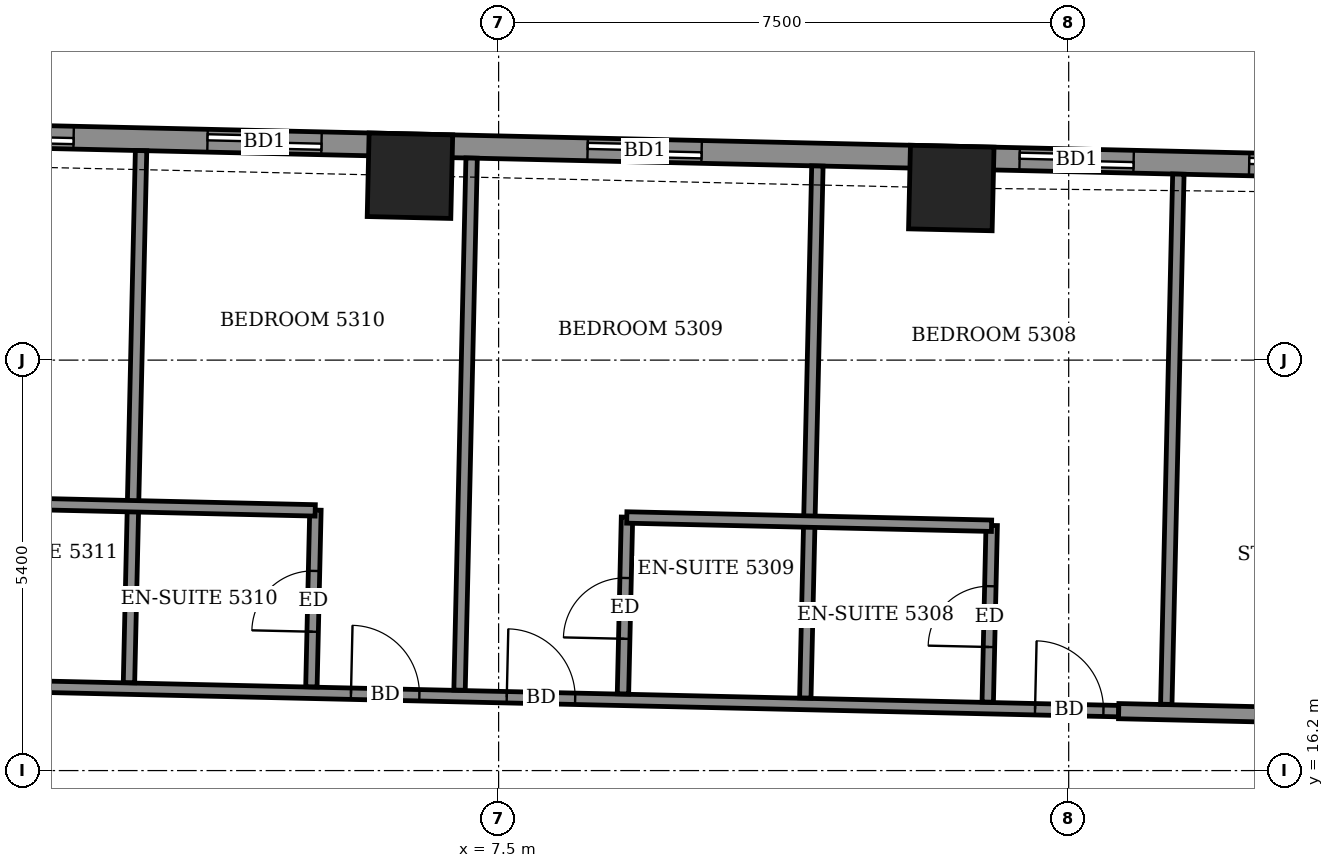
"""IFC4 building model, lengths in metres.
Left out: names, types, materials, properties, quantities, classifications, styles, units other than length and angle.
Written with IfcOpenShell. Run it as: python <this file> out.ifc"""

import sys

from ifc_helpers import new_model, si_unit, direction, frame, frame_2d, origin, origin_2d, place, context, subcontext, project, spatial, rectangle, extrude, element, fill, save


model = new_model("IFC4")
c1 = context("Model", 3, precision=1e-05, world=origin(), true_north=direction((0.0, 1.0)))
c2 = subcontext(c1, "Body", "Model", "MODEL_VIEW")
j1 = project(units=[si_unit("LENGTHUNIT", "METRE"), si_unit("PLANEANGLEUNIT", "RADIAN")], contexts=[c1])
p1 = place(None, origin())
s1 = spatial("IfcSite", under=j1, at=p1, CompositionType="ELEMENT")
p2 = place(p1, origin())
s2 = spatial("IfcBuilding", under=s1, at=p2, CompositionType="ELEMENT")
p3 = place(p2, frame((0.0, 0.0, 208.7)))
s3 = spatial("IfcBuildingStorey", under=s2, at=p3, CompositionType="ELEMENT", Elevation=208.7)
for number, where, z_axis, x_axis in (
    (1, (13.456, 23.864, -0.55), (0.0, 0.0, 1.0), (-1.0, 0.023, 0.0)),
    (2, (6.333, 24.026, -0.55), (0.0, 0.0, 1.0), (-1.0, 0.023, 0.0)),
):
    element("IfcColumn", number, at=place(p3, frame(where, z_axis=z_axis, x_axis=x_axis)), inside=s3, PredefinedType="COLUMN", context=c2, shape_type="SweptSolid", body=[
        extrude(rectangle(XDim=1.1, YDim=1.1, at=origin_2d()), origin(), (0.0, 0.0, 1.0), 3.6),
    ])
p4 = place(p3, frame((20.437, 24.106, 0.0), z_axis=(0.0, 0.0, 1.0), x_axis=(-0.999742506232, 0.022691875925, 0.0)))
e3 = element("IfcWall", 3, at=p4, inside=s3, PredefinedType="SOLIDWALL", context=c2, shape_type="SweptSolid", body=[
    extrude(rectangle(XDim=42.444, YDim=0.3, at=frame_2d((21.222, 0.0))), origin(), (0.0, 0.0, 1.0), 2.55),
])
p5 = place(p4, frame((1.563, 0.0, 0.0)))
e4 = element("IfcOpeningElement", 4, at=p5, cuts=e3, PredefinedType="OPENING", context=c2, shape_type="SweptSolid", body=[
    extrude(rectangle(XDim=1.5, YDim=2.4, at=frame_2d((0.75, 1.2))), frame((0.0, 0.16, 0.0), z_axis=(0.0, -1.0, 0.0), x_axis=(1.0, 0.0, 0.0)), (0.0, 0.0, 1.0), 0.32),
])
p6 = place(p4, frame((4.584, 0.0, 0.0)))
e5 = element("IfcOpeningElement", 5, at=p6, cuts=e3, PredefinedType="OPENING", context=c2, shape_type="SweptSolid", body=[
    extrude(rectangle(XDim=1.5, YDim=2.4, at=frame_2d((0.75, 1.2))), frame((0.0, 0.16, 0.0), z_axis=(0.0, -1.0, 0.0), x_axis=(1.0, 0.0, 0.0)), (0.0, 0.0, 1.0), 0.32),
])
p7 = place(p4, frame((10.269, 0.0, 0.0)))
e6 = element("IfcOpeningElement", 6, at=p7, cuts=e3, PredefinedType="OPENING", context=c2, shape_type="SweptSolid", body=[
    extrude(rectangle(XDim=1.5, YDim=2.4, at=frame_2d((0.75, 1.2))), frame((0.0, 0.16, 0.0), z_axis=(0.0, -1.0, 0.0), x_axis=(1.0, 0.0, 0.0)), (0.0, 0.0, 1.0), 0.32),
])
p8 = place(p4, frame((15.271, 0.0, 0.0)))
e7 = element("IfcOpeningElement", 7, at=p8, cuts=e3, PredefinedType="OPENING", context=c2, shape_type="SweptSolid", body=[
    extrude(rectangle(XDim=1.5, YDim=2.4, at=frame_2d((0.75, 1.2))), frame((0.0, 0.16, 0.0), z_axis=(0.0, -1.0, 0.0), x_axis=(1.0, 0.0, 0.0)), (0.0, 0.0, 1.0), 0.32),
])
p9 = place(p4, frame((18.533, 0.0, 0.0)))
e8 = element("IfcOpeningElement", 8, at=p9, cuts=e3, PredefinedType="OPENING", context=c2, shape_type="SweptSolid", body=[
    extrude(rectangle(XDim=1.5, YDim=2.4, at=frame_2d((0.75, 1.2))), frame((0.0, 0.16, 0.0), z_axis=(0.0, -1.0, 0.0), x_axis=(1.0, 0.0, 0.0)), (0.0, 0.0, 1.0), 0.32),
])
p10 = place(p4, frame((23.819, 0.0, 0.0)))
e9 = element("IfcOpeningElement", 9, at=p10, cuts=e3, PredefinedType="OPENING", context=c2, shape_type="SweptSolid", body=[
    extrude(rectangle(XDim=1.5, YDim=2.4, at=frame_2d((0.75, 1.2))), frame((0.0, 0.16, 0.0), z_axis=(0.0, -1.0, 0.0), x_axis=(1.0, 0.0, 0.0)), (0.0, 0.0, 1.0), 0.32),
])
p11 = place(p4, frame((29.345, 0.0, 0.0)))
e10 = element("IfcOpeningElement", 10, at=p11, cuts=e3, PredefinedType="OPENING", context=c2, shape_type="SweptSolid", body=[
    extrude(rectangle(XDim=1.5, YDim=2.4, at=frame_2d((0.75, 1.2))), frame((0.0, 0.16, 0.0), z_axis=(0.0, -1.0, 0.0), x_axis=(1.0, 0.0, 0.0)), (0.0, 0.0, 1.0), 0.32),
])
p12 = place(p4, frame((32.607, 0.0, 0.0)))
e11 = element("IfcOpeningElement", 11, at=p12, cuts=e3, PredefinedType="OPENING", context=c2, shape_type="SweptSolid", body=[
    extrude(rectangle(XDim=1.5, YDim=2.4, at=frame_2d((0.75, 1.2))), frame((0.0, 0.16, 0.0), z_axis=(0.0, -1.0, 0.0), x_axis=(1.0, 0.0, 0.0)), (0.0, 0.0, 1.0), 0.32),
])
p13 = place(p4, frame((37.783, 0.0, 0.9)))
e12 = element("IfcOpeningElement", 12, at=p13, cuts=e3, PredefinedType="OPENING", context=c2, shape_type="SweptSolid", body=[
    extrude(rectangle(XDim=2.4, YDim=1.5, at=frame_2d((1.2, 0.75))), frame((0.0, 0.16, 0.0), z_axis=(0.0, -1.0, 0.0), x_axis=(1.0, 0.0, 0.0)), (0.0, 0.0, 1.0), 0.32),
])
p14 = place(p3, frame((-14.871, 17.675, 0.0), z_axis=(0.0, 0.0, 1.0), x_axis=(0.999742359486, -0.02269834024, 0.0)))
e13 = element("IfcWall", 13, at=p14, inside=s3, PredefinedType="PARTITIONING", context=c2, shape_type="SweptSolid", body=[
    extrude(rectangle(XDim=30.536, YDim=0.15, at=frame_2d((15.268, 0.0))), origin(), (0.0, 0.0, 1.0), 3.05),
])
p15 = place(p14, frame((29.436, 0.0, 0.0)))
e14 = element("IfcOpeningElement", 14, at=p15, cuts=e13, PredefinedType="OPENING", context=c2, shape_type="SweptSolid", body=[
    extrude(rectangle(XDim=0.9, YDim=2.1, at=frame_2d((0.45, 1.05))), frame((0.0, 0.085, 0.0), z_axis=(0.0, -1.0, 0.0), x_axis=(1.0, 0.0, 0.0)), (0.0, 0.0, 1.0), 0.17),
])
p16 = place(p14, frame((22.484, 0.0, 0.0)))
e15 = element("IfcOpeningElement", 15, at=p16, cuts=e13, PredefinedType="OPENING", context=c2, shape_type="SweptSolid", body=[
    extrude(rectangle(XDim=0.9, YDim=2.1, at=frame_2d((0.45, 1.05))), frame((0.0, 0.085, 0.0), z_axis=(0.0, -1.0, 0.0), x_axis=(1.0, 0.0, 0.0)), (0.0, 0.0, 1.0), 0.17),
])
p17 = place(p14, frame((20.434, 0.0, 0.0)))
e16 = element("IfcOpeningElement", 16, at=p17, cuts=e13, PredefinedType="OPENING", context=c2, shape_type="SweptSolid", body=[
    extrude(rectangle(XDim=0.9, YDim=2.1, at=frame_2d((0.45, 1.05))), frame((0.0, 0.085, 0.0), z_axis=(0.0, -1.0, 0.0), x_axis=(1.0, 0.0, 0.0)), (0.0, 0.0, 1.0), 0.17),
])
p18 = place(p14, frame((13.484, 0.0, 0.0)))
e17 = element("IfcOpeningElement", 17, at=p18, cuts=e13, PredefinedType="OPENING", context=c2, shape_type="SweptSolid", body=[
    extrude(rectangle(XDim=0.9, YDim=2.1, at=frame_2d((0.45, 1.05))), frame((0.0, 0.085, 0.0), z_axis=(0.0, -1.0, 0.0), x_axis=(1.0, 0.0, 0.0)), (0.0, 0.0, 1.0), 0.17),
])
p19 = place(p14, frame((11.334, 0.0, 0.0)))
e18 = element("IfcOpeningElement", 18, at=p19, cuts=e13, PredefinedType="OPENING", context=c2, shape_type="SweptSolid", body=[
    extrude(rectangle(XDim=0.9, YDim=2.1, at=frame_2d((0.45, 1.05))), frame((0.0, 0.085, 0.0), z_axis=(0.0, -1.0, 0.0), x_axis=(1.0, 0.0, 0.0)), (0.0, 0.0, 1.0), 0.17),
])
p20 = place(p14, frame((4.359, 0.0, 0.0)))
e19 = element("IfcOpeningElement", 19, at=p20, cuts=e13, PredefinedType="OPENING", context=c2, shape_type="SweptSolid", body=[
    extrude(rectangle(XDim=0.9, YDim=2.1, at=frame_2d((0.45, 1.05))), frame((0.0, 0.085, 0.0), z_axis=(0.0, -1.0, 0.0), x_axis=(1.0, 0.0, 0.0)), (0.0, 0.0, 1.0), 0.17),
])
p21 = place(p14, frame((2.009, 0.0, 0.0)))
e20 = element("IfcOpeningElement", 20, at=p21, cuts=e13, PredefinedType="OPENING", context=c2, shape_type="SweptSolid", body=[
    extrude(rectangle(XDim=0.9, YDim=2.1, at=frame_2d((0.45, 1.05))), frame((0.0, 0.085, 0.0), z_axis=(0.0, -1.0, 0.0), x_axis=(1.0, 0.0, 0.0)), (0.0, 0.0, 1.0), 0.17),
])
p22 = place(p3, frame((15.658, 16.982, 0.0), z_axis=(0.0, 0.0, 1.0), x_axis=(0.99974485859, -0.022587999516, 0.0)))
e21 = element("IfcWall", 21, at=p22, inside=s3, PredefinedType="PARTITIONING", context=c2, shape_type="SweptSolid", body=[
    extrude(rectangle(XDim=7.566, YDim=0.2, at=frame_2d((3.783, 0.0))), origin(), (0.0, 0.0, 1.0), 3.05),
])
p23 = place(p22, frame((3.658, 0.0, 0.0)))
e22 = element("IfcOpeningElement", 22, at=p23, cuts=e21, PredefinedType="OPENING", context=c2, shape_type="SweptSolid", body=[
    extrude(rectangle(XDim=1.0, YDim=2.1, at=frame_2d((0.5, 1.05))), frame((0.0, 0.11, 0.0), z_axis=(0.0, -1.0, 0.0), x_axis=(1.0, 0.0, 0.0)), (0.0, 0.0, 1.0), 0.22),
])
p24 = place(p3, frame((2.637, 17.357, 0.0), z_axis=(0.0, 0.0, 1.0), x_axis=(0.022702393474, 0.999742267452, 0.0)))
e23 = element("IfcWall", 23, at=p24, inside=s3, PredefinedType="PARTITIONING", context=c2, shape_type="SweptSolid", body=[
    extrude(rectangle(XDim=7.001, YDim=0.15, at=frame_2d((3.5, 0.0))), origin(), (0.0, 0.0, 1.0), 2.5),
])
p25 = place(p3, frame((5.037, 17.302, 0.0), z_axis=(0.0, 0.0, 1.0), x_axis=(0.022781023197, 0.999740478815, 0.0)))
e24 = element("IfcWall", 24, at=p25, inside=s3, PredefinedType="PARTITIONING", context=c2, shape_type="SweptSolid", body=[
    extrude(rectangle(XDim=2.325, YDim=0.15, at=frame_2d((1.163, 0.0))), origin(), (0.0, 0.0, 1.0), 3.05),
])
p26 = place(p25, frame((0.725, 0.0, 0.0)))
e25 = element("IfcOpeningElement", 25, at=p26, cuts=e24, PredefinedType="OPENING", context=c2, shape_type="SweptSolid", body=[
    extrude(rectangle(XDim=0.8, YDim=2.1, at=frame_2d((0.4, 1.05))), frame((0.0, 0.085, 0.0), z_axis=(0.0, -1.0, 0.0), x_axis=(1.0, 0.0, 0.0)), (0.0, 0.0, 1.0), 0.17),
])
p27 = place(p3, frame((6.986, 17.258, 0.0), z_axis=(0.0, 0.0, 1.0), x_axis=(0.022699227919, 0.999742339331, 0.0)))
e26 = element("IfcWall", 26, at=p27, inside=s3, PredefinedType="PARTITIONING", context=c2, shape_type="SweptSolid", body=[
    extrude(rectangle(XDim=7.002, YDim=0.15, at=frame_2d((3.501, 0.0))), origin(), (0.0, 0.0, 1.0), 2.5),
])
p28 = place(p3, frame((9.136, 17.209, 0.0), z_axis=(0.0, 0.0, 1.0), x_axis=(0.022781023197, 0.999740478815, 0.0)))
e27 = element("IfcWall", 27, at=p28, inside=s3, PredefinedType="PARTITIONING", context=c2, shape_type="SweptSolid", body=[
    extrude(rectangle(XDim=2.325, YDim=0.15, at=frame_2d((1.163, 0.0))), origin(), (0.0, 0.0, 1.0), 3.05),
])
p29 = place(p28, frame((0.725, 0.0, 0.0)))
e28 = element("IfcOpeningElement", 28, at=p29, cuts=e27, PredefinedType="OPENING", context=c2, shape_type="SweptSolid", body=[
    extrude(rectangle(XDim=0.8, YDim=2.1, at=frame_2d((0.4, 1.05))), frame((0.0, 0.085, 0.0), z_axis=(0.0, -1.0, 0.0), x_axis=(1.0, 0.0, 0.0)), (0.0, 0.0, 1.0), 0.17),
])
p30 = place(p3, frame((11.535, 17.155, 0.0), z_axis=(0.0, 0.0, 1.0), x_axis=(0.022737248567, 0.999741475346, 0.0)))
e29 = element("IfcWall", 29, at=p30, inside=s3, PredefinedType="PARTITIONING", context=c2, shape_type="SweptSolid", body=[
    extrude(rectangle(XDim=7.001, YDim=0.15, at=frame_2d((3.5, 0.0))), origin(), (0.0, 0.0, 1.0), 2.5),
])
p31 = place(p3, frame((13.935, 17.101, 0.0), z_axis=(0.0, 0.0, 1.0), x_axis=(0.022370700241, 0.999749744571, 0.0)))
e30 = element("IfcWall", 30, at=p31, inside=s3, PredefinedType="PARTITIONING", context=c2, shape_type="SweptSolid", body=[
    extrude(rectangle(XDim=2.324, YDim=0.15, at=frame_2d((1.162, 0.0))), origin(), (0.0, 0.0, 1.0), 3.05),
])
p32 = place(p31, frame((0.725, 0.0, 0.0)))
e31 = element("IfcOpeningElement", 31, at=p32, cuts=e30, PredefinedType="OPENING", context=c2, shape_type="SweptSolid", body=[
    extrude(rectangle(XDim=0.8, YDim=2.1, at=frame_2d((0.4, 1.05))), frame((0.0, 0.085, 0.0), z_axis=(0.0, -1.0, 0.0), x_axis=(1.0, 0.0, 0.0)), (0.0, 0.0, 1.0), 0.17),
])
p33 = place(p3, frame((16.284, 17.072, 0.0), z_axis=(0.0, 0.0, 1.0), x_axis=(0.022815200701, 0.99973969943, 0.0)))
e32 = element("IfcWall", 32, at=p33, inside=s3, PredefinedType="PARTITIONING", context=c2, shape_type="SweptSolid", body=[
    extrude(rectangle(XDim=6.977, YDim=0.15, at=frame_2d((3.488, 0.0))), origin(), (0.0, 0.0, 1.0), 2.55),
])
p34 = place(p3, frame((0.289, 19.732, 0.0), z_axis=(0.0, 0.0, 1.0), x_axis=(0.999742570398, -0.022689048768, 0.0)))
e33 = element("IfcWall", 33, at=p34, inside=s3, PredefinedType="PARTITIONING", context=c2, shape_type="SweptSolid", body=[
    extrude(rectangle(XDim=4.799, YDim=0.15, at=frame_2d((2.399, 0.0))), origin(), (0.0, 0.0, 1.0), 3.05),
])
p35 = place(p3, frame((9.186, 19.53, 0.0), z_axis=(0.0, 0.0, 1.0), x_axis=(0.99974154664, -0.022734113616, 0.0)))
e34 = element("IfcWall", 34, at=p35, inside=s3, PredefinedType="PARTITIONING", context=c2, shape_type="SweptSolid", body=[
    extrude(rectangle(XDim=4.8, YDim=0.15, at=frame_2d((2.4, 0.0))), origin(), (0.0, 0.0, 1.0), 3.05),
])
p36 = place(p5, origin())
e35 = element("IfcDoor", 35, at=p36, inside=s3, OperationType="SLIDING_TO_LEFT", PredefinedType="DOOR", context=c2, shape_type="SweptSolid", body=[
    extrude(rectangle(XDim=1.5, YDim=2.4, at=frame_2d((0.75, 1.2))), frame((0.0, 0.025, 0.0), z_axis=(0.0, -1.0, 0.0), x_axis=(1.0, 0.0, 0.0)), (0.0, 0.0, 1.0), 0.05),
])
fill(e4, e35)
p37 = place(p6, origin())
e36 = element("IfcDoor", 36, at=p37, inside=s3, OperationType="SLIDING_TO_LEFT", PredefinedType="DOOR", context=c2, shape_type="SweptSolid", body=[
    extrude(rectangle(XDim=1.5, YDim=2.4, at=frame_2d((0.75, 1.2))), frame((0.0, 0.025, 0.0), z_axis=(0.0, -1.0, 0.0), x_axis=(1.0, 0.0, 0.0)), (0.0, 0.0, 1.0), 0.05),
])
fill(e5, e36)
p38 = place(p7, origin())
e37 = element("IfcDoor", 37, at=p38, inside=s3, OperationType="SLIDING_TO_LEFT", PredefinedType="DOOR", context=c2, shape_type="SweptSolid", body=[
    extrude(rectangle(XDim=1.5, YDim=2.4, at=frame_2d((0.75, 1.2))), frame((0.0, 0.025, 0.0), z_axis=(0.0, -1.0, 0.0), x_axis=(1.0, 0.0, 0.0)), (0.0, 0.0, 1.0), 0.05),
])
fill(e6, e37)
p39 = place(p8, origin())
e38 = element("IfcDoor", 38, at=p39, inside=s3, OperationType="SLIDING_TO_LEFT", PredefinedType="DOOR", context=c2, shape_type="SweptSolid", body=[
    extrude(rectangle(XDim=1.5, YDim=2.4, at=frame_2d((0.75, 1.2))), frame((0.0, 0.025, 0.0), z_axis=(0.0, -1.0, 0.0), x_axis=(1.0, 0.0, 0.0)), (0.0, 0.0, 1.0), 0.05),
])
fill(e7, e38)
p40 = place(p9, origin())
e39 = element("IfcDoor", 39, at=p40, inside=s3, OperationType="SLIDING_TO_LEFT", PredefinedType="DOOR", context=c2, shape_type="SweptSolid", body=[
    extrude(rectangle(XDim=1.5, YDim=2.4, at=frame_2d((0.75, 1.2))), frame((0.0, 0.025, 0.0), z_axis=(0.0, -1.0, 0.0), x_axis=(1.0, 0.0, 0.0)), (0.0, 0.0, 1.0), 0.05),
])
fill(e8, e39)
p41 = place(p15, origin())
e40 = element("IfcDoor", 40, at=p41, inside=s3, OperationType="SINGLE_SWING_RIGHT", PredefinedType="DOOR", context=c2, shape_type="SweptSolid", body=[
    extrude(rectangle(XDim=0.9, YDim=2.1, at=frame_2d((0.45, 1.05))), frame((0.0, 0.025, 0.0), z_axis=(0.0, -1.0, 0.0), x_axis=(1.0, 0.0, 0.0)), (0.0, 0.0, 1.0), 0.05),
])
fill(e14, e40)
p42 = place(p32, origin())
e41 = element("IfcDoor", 41, at=p42, inside=s3, OperationType="SINGLE_SWING_RIGHT", PredefinedType="DOOR", context=c2, shape_type="SweptSolid", body=[
    extrude(rectangle(XDim=0.8, YDim=2.1, at=frame_2d((0.4, 1.05))), frame((0.0, 0.025, 0.0), z_axis=(0.0, -1.0, 0.0), x_axis=(1.0, 0.0, 0.0)), (0.0, 0.0, 1.0), 0.05),
])
fill(e31, e41)
p43 = place(p16, origin())
e42 = element("IfcDoor", 42, at=p43, inside=s3, OperationType="SINGLE_SWING_LEFT", PredefinedType="DOOR", context=c2, shape_type="SweptSolid", body=[
    extrude(rectangle(XDim=0.9, YDim=2.1, at=frame_2d((0.45, 1.05))), frame((0.0, 0.025, 0.0), z_axis=(0.0, -1.0, 0.0), x_axis=(1.0, 0.0, 0.0)), (0.0, 0.0, 1.0), 0.05),
])
fill(e15, e42)
p44 = place(p29, origin())
e43 = element("IfcDoor", 43, at=p44, inside=s3, OperationType="SINGLE_SWING_LEFT", PredefinedType="DOOR", context=c2, shape_type="SweptSolid", body=[
    extrude(rectangle(XDim=0.8, YDim=2.1, at=frame_2d((0.4, 1.05))), frame((0.0, 0.025, 0.0), z_axis=(0.0, -1.0, 0.0), x_axis=(1.0, 0.0, 0.0)), (0.0, 0.0, 1.0), 0.05),
])
fill(e28, e43)
p45 = place(p17, origin())
e44 = element("IfcDoor", 44, at=p45, inside=s3, OperationType="SINGLE_SWING_RIGHT", PredefinedType="DOOR", context=c2, shape_type="SweptSolid", body=[
    extrude(rectangle(XDim=0.9, YDim=2.1, at=frame_2d((0.45, 1.05))), frame((0.0, 0.025, 0.0), z_axis=(0.0, -1.0, 0.0), x_axis=(1.0, 0.0, 0.0)), (0.0, 0.0, 1.0), 0.05),
])
fill(e16, e44)
p46 = place(p26, origin())
e45 = element("IfcDoor", 45, at=p46, inside=s3, OperationType="SINGLE_SWING_RIGHT", PredefinedType="DOOR", context=c2, shape_type="SweptSolid", body=[
    extrude(rectangle(XDim=0.8, YDim=2.1, at=frame_2d((0.4, 1.05))), frame((0.0, 0.025, 0.0), z_axis=(0.0, -1.0, 0.0), x_axis=(1.0, 0.0, 0.0)), (0.0, 0.0, 1.0), 0.05),
])
fill(e25, e45)
save(model, sys.argv[1])
